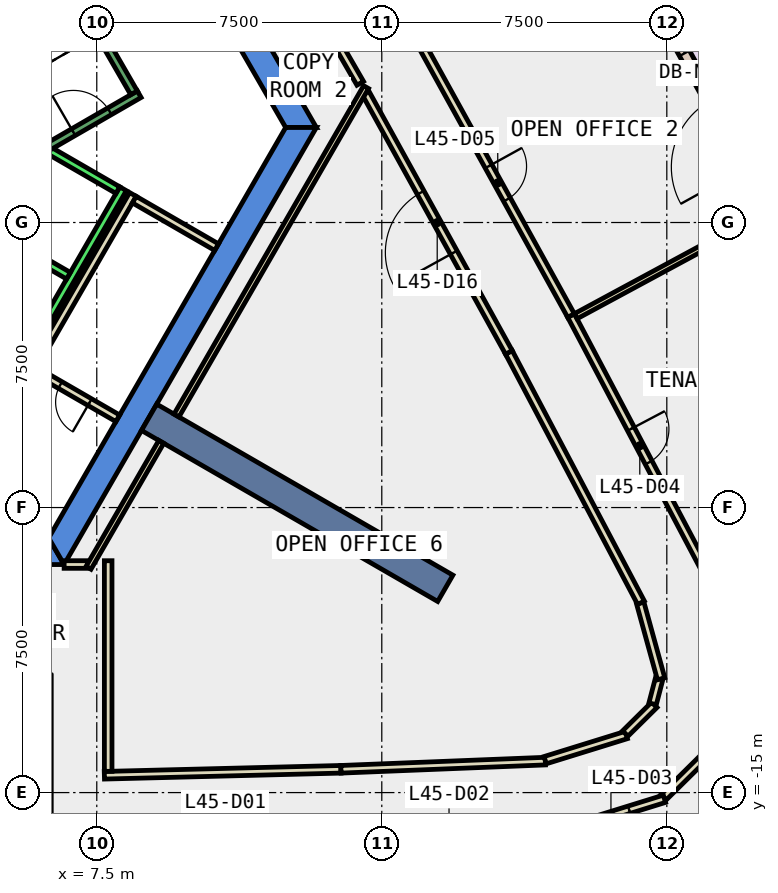
"""IFC4 building model, lengths in metres.
Left out: names, types, materials, properties, quantities, classifications, styles, units other than length and angle.
Written with IfcOpenShell. Run it as: python <this file> out.ifc"""

import sys

from ifc_helpers import new_model, si_unit, direction, frame, frame_2d, origin, place, context, subcontext, project, spatial, polyline, rectangle, outline, extrude, element, fill, save


model = new_model("IFC4")
c1 = context("Model", 3, precision=1e-05, world=origin(), true_north=direction((0.0, 1.0)))
c2 = subcontext(c1, "Body", "Model", "MODEL_VIEW")
j1 = project(units=[si_unit("LENGTHUNIT", "METRE"), si_unit("PLANEANGLEUNIT", "RADIAN")], contexts=[c1])
p1 = place(None, origin())
s1 = spatial("IfcSite", under=j1, at=p1, CompositionType="ELEMENT")
p2 = place(p1, origin())
s2 = spatial("IfcBuilding", under=s1, at=p2, CompositionType="ELEMENT")
p3 = place(p2, frame((0.0, 0.0, 202.4)))
s3 = spatial("IfcBuildingStorey", under=s2, at=p3, CompositionType="ELEMENT", Elevation=202.4)
p4 = place(p3, frame((0.0, 0.0, -0.4)))
e1 = element("IfcWall", 1, at=p4, inside=s3, PredefinedType="SHEAR", context=c2, shape_type="SweptSolid", body=[
    extrude(outline(polyline([(8.084, 11.498), (7.478, 11.148), (12.471, 2.5), (13.279, 2.5), (8.084, 11.498)])), origin(), (0.0, 0.0, 1.0), 4.2),
])
p5 = place(p3, frame((0.0, 0.0, -0.4)))
e2 = element("IfcWall", 2, at=p5, inside=s3, PredefinedType="SHEAR", context=c2, shape_type="SweptSolid", body=[
    extrude(outline(polyline([(5.75, -8.3), (5.75, -9.0), (6.64, -9.0), (6.235, -8.3), (5.75, -8.3)])), origin(), (0.0, 0.0, 1.0), 4.2),
])
p6 = place(p3, frame((0.0, 0.0, -0.4)))
e3 = element("IfcWall", 3, at=p6, inside=s3, PredefinedType="SHEAR", context=c2, shape_type="SweptSolid", body=[
    extrude(outline(polyline([(6.64, -9.0), (13.279, 2.5), (12.471, 2.5), (6.235, -8.3), (6.64, -9.0)])), origin(), (0.0, 0.0, 1.0), 4.2),
])
p7 = place(p3, frame((8.877, -5.125, -0.4), z_axis=(0.0, 0.0, 1.0), x_axis=(0.866017533419, -0.500013631625, 0.0)))
e4 = element("IfcWall", 4, at=p7, inside=s3, PredefinedType="SHEAR", context=c2, shape_type="SweptSolid", body=[
    extrude(rectangle(XDim=9.0, YDim=0.8, at=frame_2d((4.5, 0.0))), origin(), (0.0, 0.0, 1.0), 4.2),
])
p8 = place(p3, frame((25.01, 0.751, 0.0), z_axis=(0.0, 0.0, 1.0), x_axis=(-0.483590905878, 0.875294142419, 0.0)))
e5 = element("IfcWall", 5, at=p8, inside=s3, PredefinedType="STANDARD", context=c2, shape_type="SweptSolid", body=[
    extrude(rectangle(XDim=7.238, YDim=0.3, at=frame_2d((3.619, 0.0))), origin(), (0.0, 0.0, 1.0), 3.8),
])
p9 = place(p8, frame((0.809, 0.0, 0.0)))
e6 = element("IfcOpeningElement", 6, at=p9, cuts=e5, PredefinedType="OPENING", context=c2, shape_type="SweptSolid", body=[
    extrude(rectangle(XDim=2.0, YDim=2.4, at=frame_2d((1.0, 1.2))), frame((0.0, 0.16, 0.0), z_axis=(0.0, -1.0, 0.0), x_axis=(1.0, 0.0, 0.0)), (0.0, 0.0, 1.0), 0.32),
])
p10 = place(p8, frame((4.228, 0.0, 0.9)))
e7 = element("IfcOpeningElement", 7, at=p10, cuts=e5, PredefinedType="OPENING", context=c2, shape_type="SweptSolid", body=[
    extrude(rectangle(XDim=2.4, YDim=2.6, at=frame_2d((1.2, 1.3))), frame((0.0, 0.16, 0.0), z_axis=(0.0, -1.0, 0.0), x_axis=(1.0, 0.0, 0.0)), (0.0, 0.0, 1.0), 0.32),
])
p11 = place(p3, frame((26.318, 1.587, 0.0), z_axis=(0.0, 0.0, 1.0), x_axis=(-0.483435790988, 0.875379823843, 0.0)))
e8 = element("IfcWall", 8, at=p11, inside=s3, PredefinedType="STANDARD", context=c2, shape_type="SweptSolid", body=[
    extrude(rectangle(XDim=7.039, YDim=0.8, at=frame_2d((3.52, 0.0))), origin(), (0.0, 0.0, 1.0), 0.8),
])
p12 = place(p3, frame((14.433, 3.663, 0.0), z_axis=(0.0, 0.0, 1.0), x_axis=(-0.500149526678, 0.865939057303, 0.0)))
e9 = element("IfcWall", 9, at=p12, inside=s3, PredefinedType="PARTITIONING", context=c2, shape_type="SweptSolid", body=[
    extrude(rectangle(XDim=3.843, YDim=0.2, at=frame_2d((1.921, 0.0))), origin(), (0.0, 0.0, 1.0), 3.8),
])
p13 = place(p12, frame((1.422, 0.0, 0.0)))
e10 = element("IfcOpeningElement", 10, at=p13, cuts=e9, PredefinedType="OPENING", context=c2, shape_type="SweptSolid", body=[
    extrude(rectangle(XDim=1.0, YDim=2.1, at=frame_2d((0.5, 1.05))), frame((0.0, 0.11, 0.0), z_axis=(0.0, -1.0, 0.0), x_axis=(1.0, 0.0, 0.0)), (0.0, 0.0, 1.0), 0.22),
])
p14 = place(p3, frame((7.7, -14.544, 0.0), z_axis=(0.0, 0.0, 1.0), x_axis=(0.99968218628, 0.025209649611, 0.0)))
e11 = element("IfcWall", 11, at=p14, inside=s3, PredefinedType="PARTITIONING", context=c2, shape_type="SweptSolid", body=[
    extrude(rectangle(XDim=6.227, YDim=0.2, at=frame_2d((3.114, 0.0))), origin(), (0.0, 0.0, 1.0), 3.8),
])
p15 = place(p3, frame((13.925, -14.387, 0.0), z_axis=(0.0, 0.0, 1.0), x_axis=(0.999202986342, 0.039917315597, 0.0)))
e12 = element("IfcWall", 12, at=p15, inside=s3, PredefinedType="PARTITIONING", context=c2, shape_type="SweptSolid", body=[
    extrude(rectangle(XDim=5.382, YDim=0.2, at=frame_2d((2.691, 0.0))), origin(), (0.0, 0.0, 1.0), 3.8),
])
p16 = place(p3, frame((19.299, -14.147, 0.0), z_axis=(0.0, 0.0, 1.0), x_axis=(0.955241047187, 0.295828568211, 0.0)))
e13 = element("IfcWall", 13, at=p16, inside=s3, PredefinedType="PARTITIONING", context=c2, shape_type="SweptSolid", body=[
    extrude(rectangle(XDim=2.234, YDim=0.2, at=frame_2d((1.117, 0.0))), origin(), (0.0, 0.0, 1.0), 3.8),
])
p17 = place(p3, frame((21.408, -13.445, 0.0), z_axis=(0.0, 0.0, 1.0), x_axis=(0.711298443117, 0.702890122863, 0.0)))
e14 = element("IfcWall", 14, at=p17, inside=s3, PredefinedType="PARTITIONING", context=c2, shape_type="SweptSolid", body=[
    extrude(rectangle(XDim=1.074, YDim=0.2, at=frame_2d((0.537, 0.0))), origin(), (0.0, 0.0, 1.0), 3.8),
])
p18 = place(p3, frame((22.126, -12.664, 0.0), z_axis=(0.0, 0.0, 1.0), x_axis=(0.253079435581, 0.967445501972, 0.0)))
e15 = element("IfcWall", 15, at=p18, inside=s3, PredefinedType="PARTITIONING", context=c2, shape_type="SweptSolid", body=[
    extrude(rectangle(XDim=0.68, YDim=0.2, at=frame_2d((0.34, 0.0))), origin(), (0.0, 0.0, 1.0), 3.8),
])
p19 = place(p3, frame((22.35, -12.006, 0.0), z_axis=(0.0, 0.0, 1.0), x_axis=(-0.265584627827, 0.964087550725, 0.0)))
e16 = element("IfcWall", 16, at=p19, inside=s3, PredefinedType="PARTITIONING", context=c2, shape_type="SweptSolid", body=[
    extrude(rectangle(XDim=2.067, YDim=0.2, at=frame_2d((1.034, 0.0))), origin(), (0.0, 0.0, 1.0), 3.8),
])
p20 = place(p3, frame((21.821, -10.005, 0.0), z_axis=(0.0, 0.0, 1.0), x_axis=(-0.466770012358, 0.884378739887, 0.0)))
e17 = element("IfcWall", 17, at=p20, inside=s3, PredefinedType="PARTITIONING", context=c2, shape_type="SweptSolid", body=[
    extrude(rectangle(XDim=7.449, YDim=0.2, at=frame_2d((3.725, 0.0))), origin(), (0.0, 0.0, 1.0), 3.8),
])
p21 = place(p3, frame((18.344, -3.417, 0.0), z_axis=(0.0, 0.0, 1.0), x_axis=(-0.483555501116, 0.875313702247, 0.0)))
e18 = element("IfcWall", 18, at=p21, inside=s3, PredefinedType="PARTITIONING", context=c2, shape_type="SweptSolid", body=[
    extrude(rectangle(XDim=7.801, YDim=0.2, at=frame_2d((3.9, 0.0))), origin(), (0.0, 0.0, 1.0), 3.8),
])
p22 = place(p21, frame((3.0, 0.0, 0.0)))
e19 = element("IfcOpeningElement", 19, at=p22, cuts=e18, PredefinedType="OPENING", context=c2, shape_type="SweptSolid", body=[
    extrude(rectangle(XDim=1.8, YDim=2.1, at=frame_2d((0.9, 1.05))), frame((0.0, 0.11, 0.0), z_axis=(0.0, -1.0, 0.0), x_axis=(1.0, 0.0, 0.0)), (0.0, 0.0, 1.0), 0.22),
])
p23 = place(p3, frame((23.878, -13.675, 0.0), z_axis=(0.0, 0.0, 1.0), x_axis=(-0.710949827962, -0.703242733429, 0.0)))
e20 = element("IfcWall", 20, at=p23, inside=s3, PredefinedType="PARTITIONING", context=c2, shape_type="SweptSolid", body=[
    extrude(rectangle(XDim=2.059, YDim=0.2, at=frame_2d((1.03, 0.0))), origin(), (0.0, 0.0, 1.0), 3.8),
])
p24 = place(p3, frame((22.438, -15.163, 0.0), z_axis=(0.0, 0.0, 1.0), x_axis=(-0.955234616163, -0.295849333419, 0.0)))
e21 = element("IfcWall", 21, at=p24, inside=s3, PredefinedType="PARTITIONING", context=c2, shape_type="SweptSolid", body=[
    extrude(rectangle(XDim=2.947, YDim=0.2, at=frame_2d((1.473, 0.0))), origin(), (0.0, 0.0, 1.0), 3.8),
])
p25 = place(p24, frame((0.974, 0.0, 0.0)))
e22 = element("IfcOpeningElement", 22, at=p25, cuts=e21, PredefinedType="OPENING", context=c2, shape_type="SweptSolid", body=[
    extrude(rectangle(XDim=1.0, YDim=2.1, at=frame_2d((0.5, 1.05))), frame((0.0, 0.11, 0.0), z_axis=(0.0, -1.0, 0.0), x_axis=(1.0, 0.0, 0.0)), (0.0, 0.0, 1.0), 0.22),
])
p26 = place(p3, frame((19.98, -2.448, 0.0), z_axis=(0.0, 0.0, 1.0), x_axis=(0.466864023915, -0.884329114738, 0.0)))
e23 = element("IfcWall", 23, at=p26, inside=s3, PredefinedType="PARTITIONING", context=c2, shape_type="SweptSolid", body=[
    extrude(rectangle(XDim=7.75, YDim=0.2, at=frame_2d((3.875, 0.0))), origin(), (0.0, 0.0, 1.0), 3.8),
])
p27 = place(p26, frame((3.375, 0.0, 0.0)))
e24 = element("IfcOpeningElement", 24, at=p27, cuts=e23, PredefinedType="OPENING", context=c2, shape_type="SweptSolid", body=[
    extrude(rectangle(XDim=1.0, YDim=2.1, at=frame_2d((0.5, 1.05))), frame((0.0, 0.11, 0.0), z_axis=(0.0, -1.0, 0.0), x_axis=(1.0, 0.0, 0.0)), (0.0, 0.0, 1.0), 0.22),
])
p28 = place(p3, frame((16.051, 4.663, 0.0), z_axis=(0.0, 0.0, 1.0), x_axis=(0.483513440344, -0.875336936846, 0.0)))
e25 = element("IfcWall", 25, at=p28, inside=s3, PredefinedType="PARTITIONING", context=c2, shape_type="SweptSolid", body=[
    extrude(rectangle(XDim=8.124, YDim=0.2, at=frame_2d((4.062, 0.0))), origin(), (0.0, 0.0, 1.0), 3.8),
])
p29 = place(p28, frame((3.637, 0.0, 0.0)))
e26 = element("IfcOpeningElement", 26, at=p29, cuts=e25, PredefinedType="OPENING", context=c2, shape_type="SweptSolid", body=[
    extrude(rectangle(XDim=1.0, YDim=2.1, at=frame_2d((0.5, 1.05))), frame((0.0, 0.11, 0.0), z_axis=(0.0, -1.0, 0.0), x_axis=(1.0, 0.0, 0.0)), (0.0, 0.0, 1.0), 0.22),
])
p30 = place(p3, frame((8.053, -5.152, 0.0), z_axis=(0.0, 0.0, 1.0), x_axis=(-0.866022959057, 0.500004234368, 0.0)))
e27 = element("IfcWall", 27, at=p30, inside=s3, PredefinedType="PARTITIONING", context=c2, shape_type="SweptSolid", body=[
    extrude(rectangle(XDim=2.5, YDim=0.2, at=frame_2d((1.25, 0.0))), origin(), (0.0, 0.0, 1.0), 3.8),
])
p31 = place(p30, frame((0.85, 0.0, 0.0)))
e28 = element("IfcOpeningElement", 28, at=p31, cuts=e27, PredefinedType="OPENING", context=c2, shape_type="SweptSolid", body=[
    extrude(rectangle(XDim=0.9, YDim=2.1, at=frame_2d((0.45, 1.05))), frame((0.0, 0.11, 0.0), z_axis=(0.0, -1.0, 0.0), x_axis=(1.0, 0.0, 0.0)), (0.0, 0.0, 1.0), 0.22),
])
p32 = place(p3, frame((5.751, -3.938, 0.0), z_axis=(0.0, 0.0, 1.0), x_axis=(0.500034260056, 0.866005622828, 0.0)))
e29 = element("IfcWall", 29, at=p32, inside=s3, PredefinedType="PARTITIONING", context=c2, shape_type="SweptSolid", body=[
    extrude(rectangle(XDim=5.399, YDim=0.2, at=frame_2d((2.7, 0.0))), origin(), (0.0, 0.0, 1.0), 3.8),
])
p33 = place(p3, frame((8.488, 0.602, 0.0), z_axis=(0.0, 0.0, 1.0), x_axis=(0.866022959057, -0.500004234368, 0.0)))
e30 = element("IfcWall", 30, at=p33, inside=s3, PredefinedType="PARTITIONING", context=c2, shape_type="SweptSolid", body=[
    extrude(rectangle(XDim=2.5, YDim=0.2, at=frame_2d((1.25, 0.0))), origin(), (0.0, 0.0, 1.0), 3.8),
])
p34 = place(p3, frame((6.641, -8.999, 0.0), z_axis=(0.0, 0.0, 1.0), x_axis=(1.0, 0.0, 0.0)))
e31 = element("IfcWall", 31, at=p34, inside=s3, PredefinedType="PARTITIONING", context=c2, shape_type="SweptSolid", body=[
    extrude(rectangle(XDim=0.617, YDim=0.2, at=frame_2d((0.309, 0.0))), origin(), (0.0, 0.0, 1.0), 3.8),
])
p35 = place(p3, frame((7.283, -9.086, 0.0), z_axis=(0.0, 0.0, 1.0), x_axis=(0.500035303972, 0.866005020067, 0.0)))
e32 = element("IfcWall", 32, at=p35, inside=s3, PredefinedType="PARTITIONING", context=c2, shape_type="SweptSolid", body=[
    extrude(rectangle(XDim=3.828, YDim=0.15, at=frame_2d((1.914, 0.0))), origin(), (0.0, 0.0, 1.0), 3.8),
])
p36 = place(p3, frame((7.8, -8.899, 0.0), z_axis=(0.0, 0.0, 1.0), x_axis=(0.0, -1.0, 0.0)))
e33 = element("IfcWall", 33, at=p36, inside=s3, PredefinedType="PARTITIONING", context=c2, shape_type="SweptSolid", body=[
    extrude(rectangle(XDim=5.542, YDim=0.2, at=frame_2d((2.771, 0.0))), origin(), (0.0, 0.0, 1.0), 3.8),
])
p37 = place(p3, frame((20.103, -2.466, 0.0), z_axis=(0.0, 0.0, 1.0), x_axis=(0.879965969606, 0.475036727354, 0.0)))
e34 = element("IfcWall", 34, at=p37, inside=s3, PredefinedType="PARTITIONING", context=c2, shape_type="SweptSolid", body=[
    extrude(rectangle(XDim=4.381, YDim=0.15, at=frame_2d((2.19, 0.0))), origin(), (0.0, 0.0, 1.0), 3.8),
])
p38 = place(p3, frame((9.597, -5.079, 0.0), z_axis=(0.0, 0.0, 1.0), x_axis=(0.499962477963, 0.866047066059, 0.0)))
e35 = element("IfcWall", 35, at=p38, inside=s3, PredefinedType="PARTITIONING", context=c2, shape_type="SweptSolid", body=[
    extrude(rectangle(XDim=9.979, YDim=0.15, at=frame_2d((4.989, 0.0))), origin(), (0.0, 0.0, 1.0), 3.8),
])
p39 = place(p3, frame((5.492, -3.788, 0.0), z_axis=(0.0, 0.0, 1.0), x_axis=(0.500034260056, 0.866005622828, 0.0)))
e36 = element("IfcWall", 36, at=p39, inside=s3, PredefinedType="STANDARD", context=c2, shape_type="SweptSolid", body=[
    extrude(rectangle(XDim=5.399, YDim=0.2, at=frame_2d((2.7, 0.0))), origin(), (0.0, 0.0, 1.0), 3.8),
])
for number, where, z_axis, x_axis in (
    (37, (4.677, -0.2, 0.0), (0.0, 0.0, 1.0), (0.866, -0.5, 0.0)),
    (38, (5.977, 2.052, 0.0), (0.0, 0.0, 1.0), (0.866, -0.5, 0.0)),
):
    element("IfcWall", number, at=place(p3, frame(where, z_axis=z_axis, x_axis=x_axis)), inside=s3, PredefinedType="STANDARD", context=c2, shape_type="SweptSolid", body=[
        extrude(rectangle(XDim=2.399, YDim=0.2, at=frame_2d((1.2, 0.0))), origin(), (0.0, 0.0, 1.0), 3.8),
    ])
p40 = place(p3, frame((4.806, 1.176, 0.0), z_axis=(0.0, 0.0, 1.0), x_axis=(0.866059941101, 0.499940174841, 0.0)))
e39 = element("IfcWall", 39, at=p40, inside=s3, PredefinedType="STANDARD", context=c2, shape_type="SweptSolid", body=[
    extrude(rectangle(XDim=4.4, YDim=0.2, at=frame_2d((2.2, 0.0))), origin(), (0.0, 0.0, 1.0), 3.8),
])
p41 = place(p40, frame((2.4, 0.0, 0.0)))
e40 = element("IfcOpeningElement", 40, at=p41, cuts=e39, PredefinedType="OPENING", context=c2, shape_type="SweptSolid", body=[
    extrude(rectangle(XDim=1.1, YDim=2.2, at=frame_2d((0.55, 1.1))), frame((0.0, 0.11, 0.0), z_axis=(0.0, -1.0, 0.0), x_axis=(1.0, 0.0, 0.0)), (0.0, 0.0, 1.0), 0.22),
])
p42 = place(p3, frame((8.48, 3.412, 0.0), z_axis=(0.0, 0.0, 1.0), x_axis=(-0.499978703459, 0.866037698999, 0.0)))
e41 = element("IfcWall", 41, at=p42, inside=s3, PredefinedType="STANDARD", context=c2, shape_type="SweptSolid", body=[
    extrude(rectangle(XDim=6.9, YDim=0.2, at=frame_2d((3.45, 0.0))), origin(), (0.0, 0.0, 1.0), 3.8),
])
p43 = place(p10, origin())
e42 = element("IfcWindow", 42, at=p43, inside=s3, PartitioningType="SINGLE_PANEL", PredefinedType="WINDOW", context=c2, shape_type="SweptSolid", body=[
    extrude(rectangle(XDim=2.4, YDim=2.6, at=frame_2d((1.2, 1.3))), frame((0.0, 0.03, 0.0), z_axis=(0.0, -1.0, 0.0), x_axis=(1.0, 0.0, 0.0)), (0.0, 0.0, 1.0), 0.06),
])
fill(e7, e42)
p44 = place(p25, origin())
e43 = element("IfcDoor", 43, at=p44, inside=s3, OperationType="SINGLE_SWING_LEFT", PredefinedType="DOOR", context=c2, shape_type="SweptSolid", body=[
    extrude(rectangle(XDim=1.0, YDim=2.1, at=frame_2d((0.5, 1.05))), frame((0.0, 0.025, 0.0), z_axis=(0.0, -1.0, 0.0), x_axis=(1.0, 0.0, 0.0)), (0.0, 0.0, 1.0), 0.05),
])
fill(e22, e43)
p45 = place(p27, origin())
e44 = element("IfcDoor", 44, at=p45, inside=s3, OperationType="SINGLE_SWING_LEFT", PredefinedType="DOOR", context=c2, shape_type="SweptSolid", body=[
    extrude(rectangle(XDim=1.0, YDim=2.1, at=frame_2d((0.5, 1.05))), frame((0.0, 0.025, 0.0), z_axis=(0.0, -1.0, 0.0), x_axis=(1.0, 0.0, 0.0)), (0.0, 0.0, 1.0), 0.05),
])
fill(e24, e44)
p46 = place(p29, origin())
e45 = element("IfcDoor", 45, at=p46, inside=s3, OperationType="SINGLE_SWING_RIGHT", PredefinedType="DOOR", context=c2, shape_type="SweptSolid", body=[
    extrude(rectangle(XDim=1.0, YDim=2.1, at=frame_2d((0.5, 1.05))), frame((0.0, 0.025, 0.0), z_axis=(0.0, -1.0, 0.0), x_axis=(1.0, 0.0, 0.0)), (0.0, 0.0, 1.0), 0.05),
])
fill(e26, e45)
p47 = place(p22, origin())
e46 = element("IfcDoor", 46, at=p47, inside=s3, OperationType="DOUBLE_DOOR_SINGLE_SWING", PredefinedType="DOOR", context=c2, shape_type="SweptSolid", body=[
    extrude(rectangle(XDim=1.8, YDim=2.1, at=frame_2d((0.9, 1.05))), frame((0.0, 0.025, 0.0), z_axis=(0.0, -1.0, 0.0), x_axis=(1.0, 0.0, 0.0)), (0.0, 0.0, 1.0), 0.05),
])
fill(e19, e46)
p48 = place(p31, origin())
e47 = element("IfcDoor", 47, at=p48, inside=s3, OperationType="SINGLE_SWING_LEFT", PredefinedType="DOOR", context=c2, shape_type="SweptSolid", body=[
    extrude(rectangle(XDim=0.9, YDim=2.1, at=frame_2d((0.45, 1.05))), frame((0.0, 0.025, 0.0), z_axis=(0.0, -1.0, 0.0), x_axis=(1.0, 0.0, 0.0)), (0.0, 0.0, 1.0), 0.05),
])
fill(e28, e47)
p49 = place(p41, origin())
e48 = element("IfcDoor", 48, at=p49, inside=s3, OperationType="SINGLE_SWING_LEFT", PredefinedType="DOOR", context=c2, shape_type="SweptSolid", body=[
    extrude(rectangle(XDim=1.1, YDim=2.2, at=frame_2d((0.55, 1.1))), frame((0.0, 0.025, 0.0), z_axis=(0.0, -1.0, 0.0), x_axis=(1.0, 0.0, 0.0)), (0.0, 0.0, 1.0), 0.05),
])
fill(e40, e48)
save(model, sys.argv[1])
